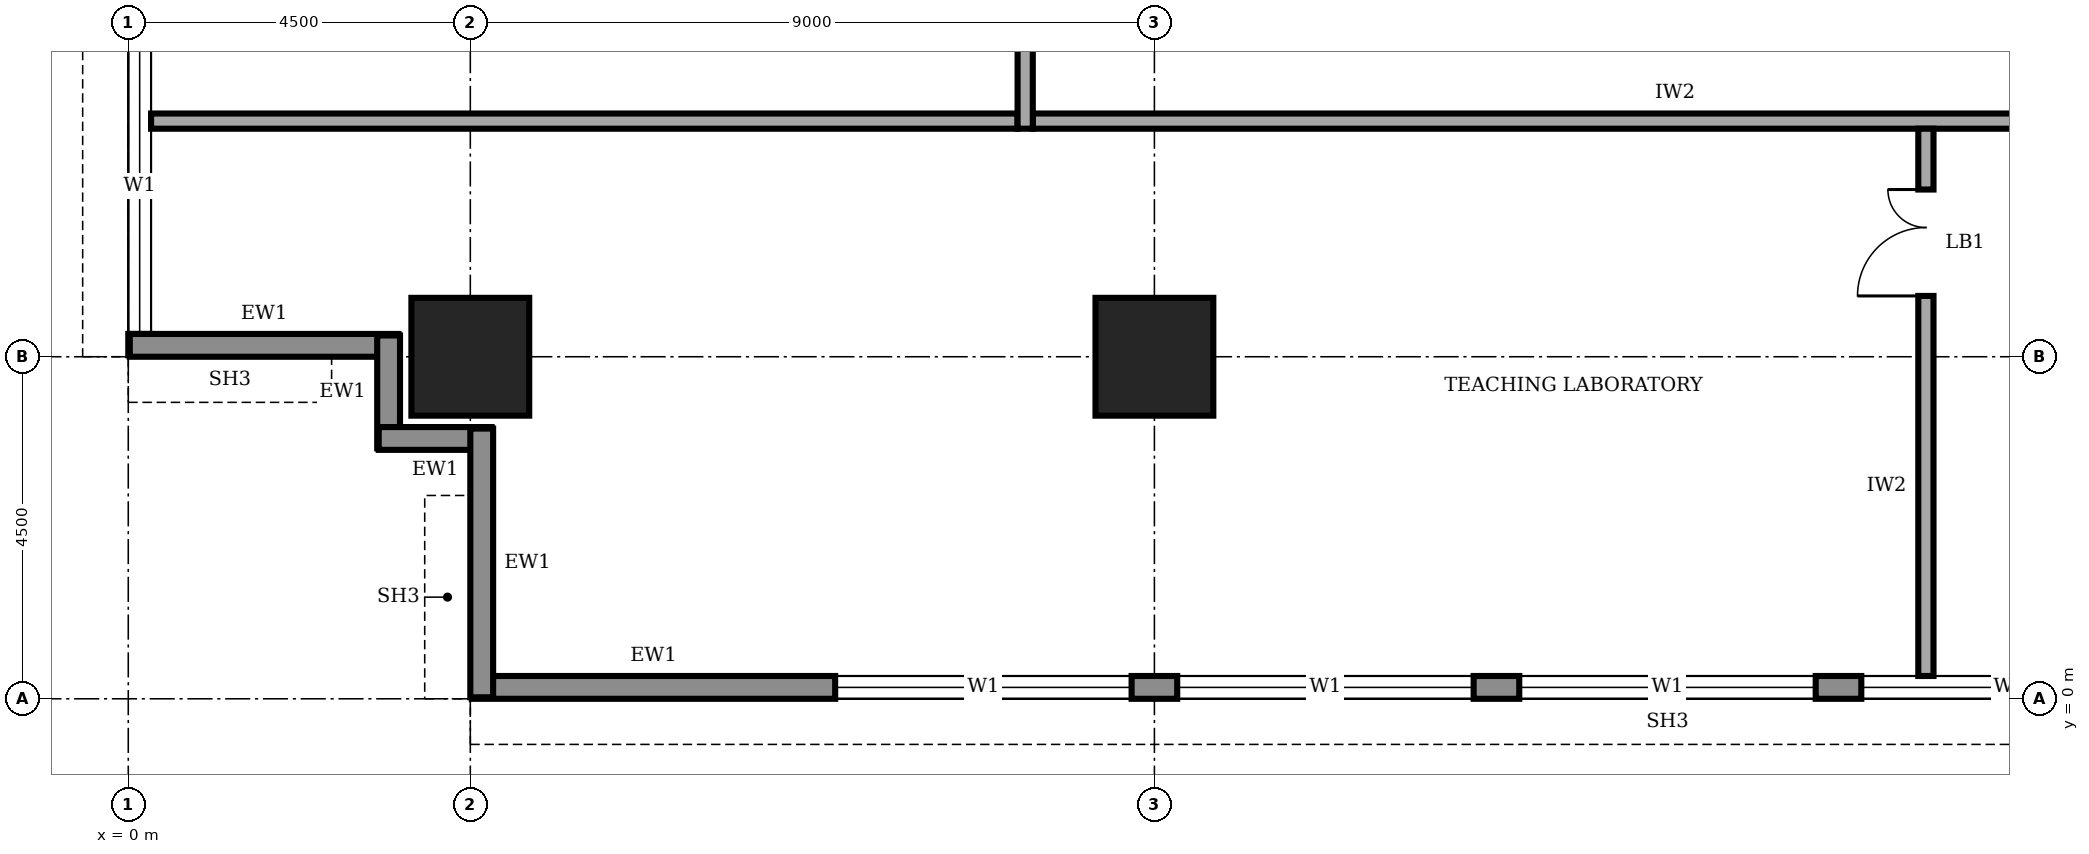
"""IFC4 building model, lengths in metres.
Left out: names, types, materials, properties, quantities, classifications, styles, units other than length and angle.
Written with IfcOpenShell. Run it as: python <this file> out.ifc"""

import sys

from ifc_helpers import new_model, si_unit, direction, frame, frame_2d, origin, origin_2d, place, context, subcontext, project, spatial, rectangle, extrude, element, fill, save


model = new_model("IFC4")
c1 = context("Model", 3, precision=1e-05, world=origin(), true_north=direction((0.0, 1.0)))
c2 = subcontext(c1, "Body", "Model", "MODEL_VIEW")
j1 = project(units=[si_unit("LENGTHUNIT", "METRE"), si_unit("PLANEANGLEUNIT", "RADIAN")], contexts=[c1])
p1 = place(None, origin())
s1 = spatial("IfcSite", under=j1, at=p1, CompositionType="ELEMENT")
p2 = place(p1, origin())
s2 = spatial("IfcBuilding", under=s1, at=p2, CompositionType="ELEMENT")
p3 = place(p2, frame((0.0, 0.0, 209.0)))
s3 = spatial("IfcBuildingStorey", under=s2, at=p3, CompositionType="ELEMENT", Elevation=209.0)
for number, where, z_axis, x_axis in (
    (1, (4.5, 4.5, 0.0), (0.0, 0.0, 1.0), (1.0, 0.0, 0.0)),
    (2, (13.5, 4.5, 0.0), (0.0, 0.0, 1.0), (1.0, 0.0, 0.0)),
):
    element("IfcColumn", number, at=place(p3, frame(where, z_axis=z_axis, x_axis=x_axis)), inside=s3, PredefinedType="COLUMN", context=c2, shape_type="SweptSolid", body=[
        extrude(rectangle(XDim=1.55, YDim=1.55, at=origin_2d()), origin(), (0.0, 0.0, 1.0), 4.0),
    ])
p4 = place(p3, frame((4.52, 0.15, 0.0), z_axis=(0.0, 0.0, 1.0), x_axis=(1.0, 0.0, 0.0)))
e3 = element("IfcWall", 3, at=p4, inside=s3, PredefinedType="STANDARD", context=c2, shape_type="SweptSolid", body=[
    extrude(rectangle(XDim=31.46, YDim=0.3, at=frame_2d((15.73, 0.0))), origin(), (0.0, 0.0, 1.0), 3.75),
])
p5 = place(p4, frame((4.78, 0.0, 0.9)))
e4 = element("IfcOpeningElement", 4, at=p5, cuts=e3, PredefinedType="OPENING", context=c2, shape_type="SweptSolid", body=[
    extrude(rectangle(XDim=3.9, YDim=2.2, at=frame_2d((1.95, 1.1))), frame((0.0, 0.16, 0.0), z_axis=(0.0, -1.0, 0.0), x_axis=(1.0, 0.0, 0.0)), (0.0, 0.0, 1.0), 0.32),
])
p6 = place(p4, frame((9.28, 0.0, 0.9)))
e5 = element("IfcOpeningElement", 5, at=p6, cuts=e3, PredefinedType="OPENING", context=c2, shape_type="SweptSolid", body=[
    extrude(rectangle(XDim=3.9, YDim=2.2, at=frame_2d((1.95, 1.1))), frame((0.0, 0.16, 0.0), z_axis=(0.0, -1.0, 0.0), x_axis=(1.0, 0.0, 0.0)), (0.0, 0.0, 1.0), 0.32),
])
p7 = place(p4, frame((13.78, 0.0, 0.9)))
e6 = element("IfcOpeningElement", 6, at=p7, cuts=e3, PredefinedType="OPENING", context=c2, shape_type="SweptSolid", body=[
    extrude(rectangle(XDim=3.9, YDim=2.2, at=frame_2d((1.95, 1.1))), frame((0.0, 0.16, 0.0), z_axis=(0.0, -1.0, 0.0), x_axis=(1.0, 0.0, 0.0)), (0.0, 0.0, 1.0), 0.32),
])
p8 = place(p4, frame((18.28, 0.0, 0.9)))
e7 = element("IfcOpeningElement", 7, at=p8, cuts=e3, PredefinedType="OPENING", context=c2, shape_type="SweptSolid", body=[
    extrude(rectangle(XDim=3.9, YDim=2.2, at=frame_2d((1.95, 1.1))), frame((0.0, 0.16, 0.0), z_axis=(0.0, -1.0, 0.0), x_axis=(1.0, 0.0, 0.0)), (0.0, 0.0, 1.0), 0.32),
])
p9 = place(p4, frame((22.78, 0.0, 0.9)))
e8 = element("IfcOpeningElement", 8, at=p9, cuts=e3, PredefinedType="OPENING", context=c2, shape_type="SweptSolid", body=[
    extrude(rectangle(XDim=3.9, YDim=2.2, at=frame_2d((1.95, 1.1))), frame((0.0, 0.16, 0.0), z_axis=(0.0, -1.0, 0.0), x_axis=(1.0, 0.0, 0.0)), (0.0, 0.0, 1.0), 0.32),
])
p10 = place(p4, frame((27.28, 0.0, 0.9)))
e9 = element("IfcOpeningElement", 9, at=p10, cuts=e3, PredefinedType="OPENING", context=c2, shape_type="SweptSolid", body=[
    extrude(rectangle(XDim=3.9, YDim=2.2, at=frame_2d((1.95, 1.1))), frame((0.0, 0.16, 0.0), z_axis=(0.0, -1.0, 0.0), x_axis=(1.0, 0.0, 0.0)), (0.0, 0.0, 1.0), 0.32),
])
p11 = place(p3, frame((0.15, 35.98, 0.0), z_axis=(0.0, 0.0, 1.0), x_axis=(0.0, -1.0, 0.0)))
e10 = element("IfcWall", 10, at=p11, inside=s3, PredefinedType="STANDARD", context=c2, shape_type="SweptSolid", body=[
    extrude(rectangle(XDim=31.46, YDim=0.3, at=frame_2d((15.73, 0.0))), origin(), (0.0, 0.0, 1.0), 3.75),
])
p12 = place(p11, frame((27.28, 0.0, 0.9)))
e11 = element("IfcOpeningElement", 11, at=p12, cuts=e10, PredefinedType="OPENING", context=c2, shape_type="SweptSolid", body=[
    extrude(rectangle(XDim=3.9, YDim=2.2, at=frame_2d((1.95, 1.1))), frame((0.0, 0.16, 0.0), z_axis=(0.0, -1.0, 0.0), x_axis=(1.0, 0.0, 0.0)), (0.0, 0.0, 1.0), 0.32),
])
p13 = place(p11, frame((22.78, 0.0, 0.9)))
e12 = element("IfcOpeningElement", 12, at=p13, cuts=e10, PredefinedType="OPENING", context=c2, shape_type="SweptSolid", body=[
    extrude(rectangle(XDim=3.9, YDim=2.2, at=frame_2d((1.95, 1.1))), frame((0.0, 0.16, 0.0), z_axis=(0.0, -1.0, 0.0), x_axis=(1.0, 0.0, 0.0)), (0.0, 0.0, 1.0), 0.32),
])
p14 = place(p11, frame((18.28, 0.0, 0.9)))
e13 = element("IfcOpeningElement", 13, at=p14, cuts=e10, PredefinedType="OPENING", context=c2, shape_type="SweptSolid", body=[
    extrude(rectangle(XDim=3.9, YDim=2.2, at=frame_2d((1.95, 1.1))), frame((0.0, 0.16, 0.0), z_axis=(0.0, -1.0, 0.0), x_axis=(1.0, 0.0, 0.0)), (0.0, 0.0, 1.0), 0.32),
])
p15 = place(p11, frame((13.78, 0.0, 0.9)))
e14 = element("IfcOpeningElement", 14, at=p15, cuts=e10, PredefinedType="OPENING", context=c2, shape_type="SweptSolid", body=[
    extrude(rectangle(XDim=3.9, YDim=2.2, at=frame_2d((1.95, 1.1))), frame((0.0, 0.16, 0.0), z_axis=(0.0, -1.0, 0.0), x_axis=(1.0, 0.0, 0.0)), (0.0, 0.0, 1.0), 0.32),
])
p16 = place(p11, frame((9.28, 0.0, 0.9)))
e15 = element("IfcOpeningElement", 15, at=p16, cuts=e10, PredefinedType="OPENING", context=c2, shape_type="SweptSolid", body=[
    extrude(rectangle(XDim=3.9, YDim=2.2, at=frame_2d((1.95, 1.1))), frame((0.0, 0.16, 0.0), z_axis=(0.0, -1.0, 0.0), x_axis=(1.0, 0.0, 0.0)), (0.0, 0.0, 1.0), 0.32),
])
p17 = place(p11, frame((4.78, 0.0, 0.9)))
e16 = element("IfcOpeningElement", 16, at=p17, cuts=e10, PredefinedType="OPENING", context=c2, shape_type="SweptSolid", body=[
    extrude(rectangle(XDim=3.9, YDim=2.2, at=frame_2d((1.95, 1.1))), frame((0.0, 0.16, 0.0), z_axis=(0.0, -1.0, 0.0), x_axis=(1.0, 0.0, 0.0)), (0.0, 0.0, 1.0), 0.32),
])
p18 = place(p3, frame((0.02, 4.65, 0.0), z_axis=(0.0, 0.0, 1.0), x_axis=(1.0, 0.0, 0.0)))
e17 = element("IfcWall", 17, at=p18, inside=s3, PredefinedType="STANDARD", context=c2, shape_type="SweptSolid", body=[
    extrude(rectangle(XDim=3.535, YDim=0.3, at=frame_2d((1.768, 0.0))), origin(), (0.0, 0.0, 1.0), 2.85),
])
for number, where, z_axis, x_axis in (
    (18, (3.425, 4.78, 0.0), (0.0, 0.0, 1.0), (0.0, -1.0, 0.0)),
    (19, (3.295, 3.425, 0.0), (0.0, 0.0, 1.0), (1.0, 0.0, 0.0)),
):
    element("IfcWall", number, at=place(p3, frame(where, z_axis=z_axis, x_axis=x_axis)), inside=s3, PredefinedType="STANDARD", context=c2, shape_type="SweptSolid", body=[
        extrude(rectangle(XDim=1.485, YDim=0.3, at=frame_2d((0.743, 0.0))), origin(), (0.0, 0.0, 1.0), 3.75),
    ])
p19 = place(p3, frame((4.65, 3.555, 0.0), z_axis=(0.0, 0.0, 1.0), x_axis=(0.0, -1.0, 0.0)))
e20 = element("IfcWall", 20, at=p19, inside=s3, PredefinedType="STANDARD", context=c2, shape_type="SweptSolid", body=[
    extrude(rectangle(XDim=3.535, YDim=0.3, at=frame_2d((1.768, 0.0))), origin(), (0.0, 0.0, 1.0), 2.85),
])
p20 = place(p3, frame((11.9, 7.6, 0.0), z_axis=(0.0, 0.0, 1.0), x_axis=(1.0, 0.0, 0.0)))
e21 = element("IfcWall", 21, at=p20, inside=s3, PredefinedType="SOLIDWALL", context=c2, shape_type="SweptSolid", body=[
    extrude(rectangle(XDim=16.9, YDim=0.2, at=frame_2d((8.45, 0.0))), origin(), (0.0, 0.0, 1.0), 3.75),
])
p21 = place(p3, frame((11.8, 31.3, 0.0), z_axis=(0.0, 0.0, 1.0), x_axis=(0.0, -1.0, 0.0)))
e22 = element("IfcWall", 22, at=p21, inside=s3, PredefinedType="SOLIDWALL", context=c2, shape_type="SweptSolid", body=[
    extrude(rectangle(XDim=23.8, YDim=0.2, at=frame_2d((11.9, 0.0))), origin(), (0.0, 0.0, 1.0), 3.75),
])
p22 = place(p21, frame((20.3, 0.0, 0.0)))
e23 = element("IfcOpeningElement", 23, at=p22, cuts=e22, PredefinedType="OPENING", context=c2, shape_type="SweptSolid", body=[
    extrude(rectangle(XDim=1.0, YDim=2.1, at=frame_2d((0.5, 1.05))), frame((0.0, 0.11, 0.0), z_axis=(0.0, -1.0, 0.0), x_axis=(1.0, 0.0, 0.0)), (0.0, 0.0, 1.0), 0.22),
])
p23 = place(p21, frame((16.15, 0.0, 0.0)))
e24 = element("IfcOpeningElement", 24, at=p23, cuts=e22, PredefinedType="OPENING", context=c2, shape_type="SweptSolid", body=[
    extrude(rectangle(XDim=0.9, YDim=2.1, at=frame_2d((0.45, 1.05))), frame((0.0, 0.11, 0.0), z_axis=(0.0, -1.0, 0.0), x_axis=(1.0, 0.0, 0.0)), (0.0, 0.0, 1.0), 0.22),
])
p24 = place(p21, frame((12.95, 0.0, 0.0)))
e25 = element("IfcOpeningElement", 25, at=p24, cuts=e22, PredefinedType="OPENING", context=c2, shape_type="SweptSolid", body=[
    extrude(rectangle(XDim=0.9, YDim=2.1, at=frame_2d((0.45, 1.05))), frame((0.0, 0.11, 0.0), z_axis=(0.0, -1.0, 0.0), x_axis=(1.0, 0.0, 0.0)), (0.0, 0.0, 1.0), 0.22),
])
p25 = place(p21, frame((7.4, 0.0, 0.0)))
e26 = element("IfcOpeningElement", 26, at=p25, cuts=e22, PredefinedType="OPENING", context=c2, shape_type="SweptSolid", body=[
    extrude(rectangle(XDim=0.9, YDim=2.1, at=frame_2d((0.45, 1.05))), frame((0.0, 0.11, 0.0), z_axis=(0.0, -1.0, 0.0), x_axis=(1.0, 0.0, 0.0)), (0.0, 0.0, 1.0), 0.22),
])
p26 = place(p21, frame((4.8, 0.0, 0.0)))
e27 = element("IfcOpeningElement", 27, at=p26, cuts=e22, PredefinedType="OPENING", context=c2, shape_type="SweptSolid", body=[
    extrude(rectangle(XDim=1.0, YDim=2.1, at=frame_2d((0.5, 1.05))), frame((0.0, 0.11, 0.0), z_axis=(0.0, -1.0, 0.0), x_axis=(1.0, 0.0, 0.0)), (0.0, 0.0, 1.0), 0.22),
])
p27 = place(p21, frame((9.9, 0.0, 0.0)))
e28 = element("IfcOpeningElement", 28, at=p27, cuts=e22, PredefinedType="OPENING", context=c2, shape_type="SweptSolid", body=[
    extrude(rectangle(XDim=1.0, YDim=2.1, at=frame_2d((0.5, 1.05))), frame((0.0, 0.11, 0.0), z_axis=(0.0, -1.0, 0.0), x_axis=(1.0, 0.0, 0.0)), (0.0, 0.0, 1.0), 0.22),
])
p28 = place(p21, frame((1.55, 0.0, 0.0)))
e29 = element("IfcOpeningElement", 29, at=p28, cuts=e22, PredefinedType="OPENING", context=c2, shape_type="SweptSolid", body=[
    extrude(rectangle(XDim=1.0, YDim=2.1, at=frame_2d((0.5, 1.05))), frame((0.0, 0.11, 0.0), z_axis=(0.0, -1.0, 0.0), x_axis=(1.0, 0.0, 0.0)), (0.0, 0.0, 1.0), 0.22),
])
p29 = place(p3, frame((23.65, 0.3, 0.0), z_axis=(0.0, 0.0, 1.0), x_axis=(0.0, 1.0, 0.0)))
e30 = element("IfcWall", 30, at=p29, inside=s3, PredefinedType="SOLIDWALL", context=c2, shape_type="SweptSolid", body=[
    extrude(rectangle(XDim=7.2, YDim=0.2, at=frame_2d((3.6, 0.0))), origin(), (0.0, 0.0, 1.0), 3.75),
])
p30 = place(p29, frame((5.0, 0.0, 0.0)))
e31 = element("IfcOpeningElement", 31, at=p30, cuts=e30, PredefinedType="OPENING", context=c2, shape_type="SweptSolid", body=[
    extrude(rectangle(XDim=1.4, YDim=2.1, at=frame_2d((0.7, 1.05))), frame((0.0, 0.11, 0.0), z_axis=(0.0, -1.0, 0.0), x_axis=(1.0, 0.0, 0.0)), (0.0, 0.0, 1.0), 0.22),
])
p31 = place(p3, frame((0.3, 7.6, 0.0), z_axis=(0.0, 0.0, 1.0), x_axis=(1.0, 0.0, 0.0)))
e32 = element("IfcWall", 32, at=p31, inside=s3, PredefinedType="SOLIDWALL", context=c2, shape_type="SweptSolid", body=[
    extrude(rectangle(XDim=11.4, YDim=0.2, at=frame_2d((5.7, 0.0))), origin(), (0.0, 0.0, 1.0), 3.75),
])
p32 = place(p5, origin())
e33 = element("IfcWindow", 33, at=p32, inside=s3, PartitioningType="SINGLE_PANEL", PredefinedType="WINDOW", context=c2, shape_type="SweptSolid", body=[
    extrude(rectangle(XDim=3.9, YDim=2.2, at=frame_2d((1.95, 1.1))), frame((0.0, 0.03, 0.0), z_axis=(0.0, -1.0, 0.0), x_axis=(1.0, 0.0, 0.0)), (0.0, 0.0, 1.0), 0.06),
])
fill(e4, e33)
p33 = place(p6, origin())
e34 = element("IfcWindow", 34, at=p33, inside=s3, PartitioningType="SINGLE_PANEL", PredefinedType="WINDOW", context=c2, shape_type="SweptSolid", body=[
    extrude(rectangle(XDim=3.9, YDim=2.2, at=frame_2d((1.95, 1.1))), frame((0.0, 0.03, 0.0), z_axis=(0.0, -1.0, 0.0), x_axis=(1.0, 0.0, 0.0)), (0.0, 0.0, 1.0), 0.06),
])
fill(e5, e34)
p34 = place(p7, origin())
e35 = element("IfcWindow", 35, at=p34, inside=s3, PartitioningType="SINGLE_PANEL", PredefinedType="WINDOW", context=c2, shape_type="SweptSolid", body=[
    extrude(rectangle(XDim=3.9, YDim=2.2, at=frame_2d((1.95, 1.1))), frame((0.0, 0.03, 0.0), z_axis=(0.0, -1.0, 0.0), x_axis=(1.0, 0.0, 0.0)), (0.0, 0.0, 1.0), 0.06),
])
fill(e6, e35)
p35 = place(p8, origin())
e36 = element("IfcWindow", 36, at=p35, inside=s3, PartitioningType="SINGLE_PANEL", PredefinedType="WINDOW", context=c2, shape_type="SweptSolid", body=[
    extrude(rectangle(XDim=3.9, YDim=2.2, at=frame_2d((1.95, 1.1))), frame((0.0, 0.03, 0.0), z_axis=(0.0, -1.0, 0.0), x_axis=(1.0, 0.0, 0.0)), (0.0, 0.0, 1.0), 0.06),
])
fill(e7, e36)
p36 = place(p12, origin())
e37 = element("IfcWindow", 37, at=p36, inside=s3, PartitioningType="SINGLE_PANEL", PredefinedType="WINDOW", context=c2, shape_type="SweptSolid", body=[
    extrude(rectangle(XDim=3.9, YDim=2.2, at=frame_2d((1.95, 1.1))), frame((0.0, 0.03, 0.0), z_axis=(0.0, -1.0, 0.0), x_axis=(1.0, 0.0, 0.0)), (0.0, 0.0, 1.0), 0.06),
])
fill(e11, e37)
p37 = place(p30, origin())
e38 = element("IfcDoor", 38, at=p37, inside=s3, OperationType="DOUBLE_DOOR_SINGLE_SWING", PredefinedType="DOOR", context=c2, shape_type="SweptSolid", body=[
    extrude(rectangle(XDim=1.4, YDim=2.1, at=frame_2d((0.7, 1.05))), frame((0.0, 0.025, 0.0), z_axis=(0.0, -1.0, 0.0), x_axis=(1.0, 0.0, 0.0)), (0.0, 0.0, 1.0), 0.05),
])
fill(e31, e38)
save(model, sys.argv[1])
